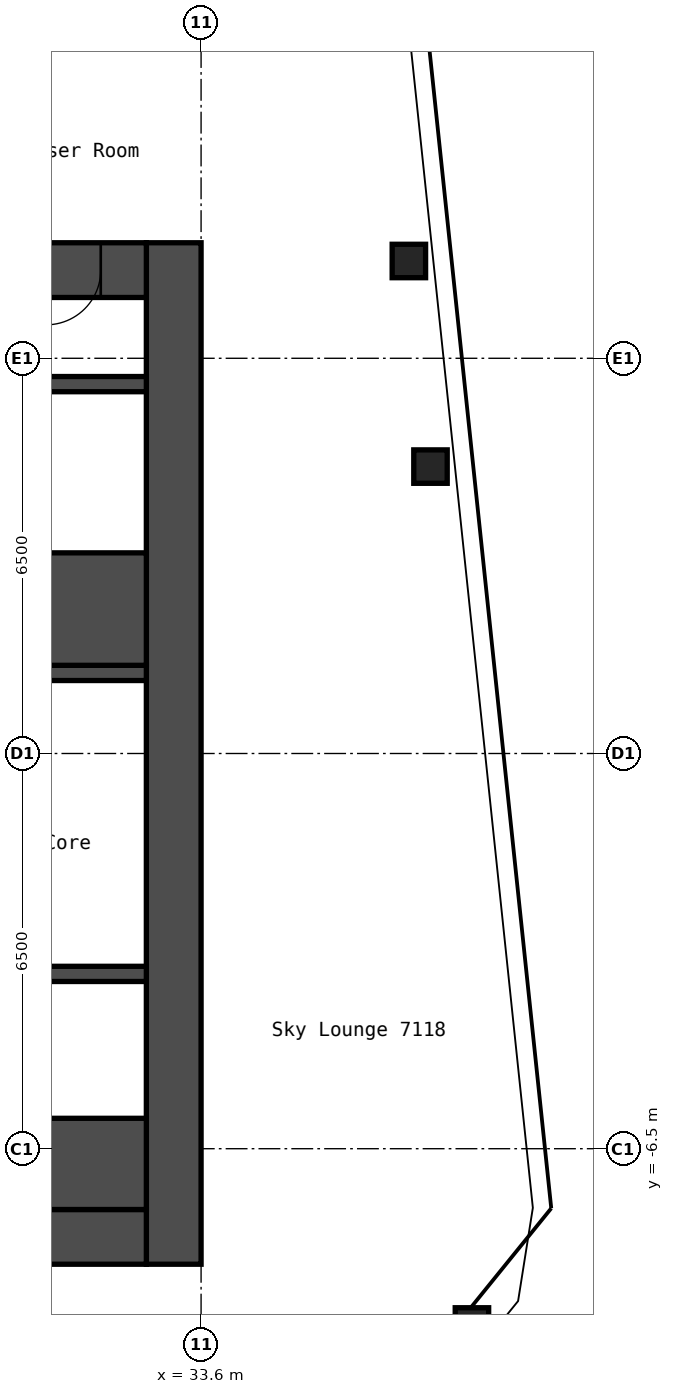
"""IFC4 building model, lengths in metres.
Left out: names, types, materials, properties, quantities, classifications, styles, units other than length and angle.
Written with IfcOpenShell. Run it as: python <this file> out.ifc"""

import sys

from ifc_helpers import new_model, si_unit, direction, frame, frame_2d, origin, origin_2d, place, context, subcontext, project, spatial, rectangle, hollow_rectangle, extrude, element, fill, save


model = new_model("IFC4")
c1 = context("Model", 3, precision=1e-05, world=origin(), true_north=direction((0.0, 1.0)))
c2 = subcontext(c1, "Body", "Model", "MODEL_VIEW")
j1 = project(units=[si_unit("LENGTHUNIT", "METRE"), si_unit("PLANEANGLEUNIT", "RADIAN")], contexts=[c1])
p1 = place(None, origin())
s1 = spatial("IfcSite", under=j1, at=p1, CompositionType="ELEMENT")
p2 = place(p1, origin())
s2 = spatial("IfcBuilding", under=s1, at=p2, CompositionType="ELEMENT")
p3 = place(p2, frame((0.0, 0.0, 251.8)))
s3 = spatial("IfcBuildingStorey", under=s2, at=p3, CompositionType="ELEMENT", Elevation=251.8)
for number, where, z_axis, x_axis in (
    (1, (38.054, -9.39, 0.0), (0.0, 0.0, 1.0), (1.0, 0.0, 0.0)),
    (2, (37.373, 4.719, 0.0), (0.0, 0.0, 1.0), (1.0, 0.0, 0.0)),
    (3, (37.017, 8.1, 0.0), (0.0, 0.0, 1.0), (1.0, 0.0, 0.0)),
):
    element("IfcColumn", number, at=place(p3, frame(where, z_axis=z_axis, x_axis=x_axis)), inside=s3, PredefinedType="COLUMN", context=c2, shape_type="SweptSolid", body=[
        extrude(hollow_rectangle(XDim=0.55, YDim=0.55, WallThickness=0.022, InnerFilletRadius=0.033, OuterFilletRadius=0.055, at=origin_2d()), origin(), (0.0, 0.0, 1.0), 2.75),
    ])
p4 = place(p3, frame((33.15, -8.4, 0.0), z_axis=(0.0, 0.0, 1.0), x_axis=(0.0, 1.0, 0.0)))
e4 = element("IfcWall", 4, at=p4, inside=s3, PredefinedType="SHEAR", context=c2, shape_type="SweptSolid", body=[
    extrude(rectangle(XDim=16.8, YDim=0.9, at=frame_2d((8.4, 0.0))), origin(), (0.0, 0.0, 1.0), 2.75),
])
p5 = place(p3, frame((17.7, 7.95, 0.0), z_axis=(0.0, 0.0, 1.0), x_axis=(1.0, 0.0, 0.0)))
e5 = element("IfcWall", 5, at=p5, inside=s3, PredefinedType="SHEAR", context=c2, shape_type="SweptSolid", body=[
    extrude(rectangle(XDim=15.0, YDim=0.9, at=frame_2d((7.5, 0.0))), origin(), (0.0, 0.0, 1.0), 2.75),
])
p6 = place(p5, frame((10.4, 0.0, 0.0)))
e6 = element("IfcOpeningElement", 6, at=p6, cuts=e5, PredefinedType="OPENING", context=c2, shape_type="SweptSolid", body=[
    extrude(rectangle(XDim=1.2, YDim=2.1, at=frame_2d((0.6, 1.05))), frame((0.0, 0.46, 0.0), z_axis=(0.0, -1.0, 0.0), x_axis=(1.0, 0.0, 0.0)), (0.0, 0.0, 1.0), 0.92),
])
p7 = place(p5, frame((13.35, 0.0, 0.0)))
e7 = element("IfcOpeningElement", 7, at=p7, cuts=e5, PredefinedType="OPENING", context=c2, shape_type="SweptSolid", body=[
    extrude(rectangle(XDim=0.9, YDim=2.1, at=frame_2d((0.45, 1.05))), frame((0.0, 0.46, 0.0), z_axis=(0.0, -1.0, 0.0), x_axis=(1.0, 0.0, 0.0)), (0.0, 0.0, 1.0), 0.92),
])
p8 = place(p3, frame((17.7, -7.95, 0.0), z_axis=(0.0, 0.0, 1.0), x_axis=(1.0, 0.0, 0.0)))
e8 = element("IfcWall", 8, at=p8, inside=s3, PredefinedType="SHEAR", context=c2, shape_type="SweptSolid", body=[
    extrude(rectangle(XDim=15.0, YDim=0.9, at=frame_2d((7.5, 0.0))), origin(), (0.0, 0.0, 1.0), 2.75),
])
p9 = place(p8, frame((2.55, 0.0, 0.0)))
e9 = element("IfcOpeningElement", 9, at=p9, cuts=e8, PredefinedType="OPENING", context=c2, shape_type="SweptSolid", body=[
    extrude(rectangle(XDim=1.0, YDim=2.1, at=frame_2d((0.5, 1.05))), frame((0.0, 0.46, 0.0), z_axis=(0.0, -1.0, 0.0), x_axis=(1.0, 0.0, 0.0)), (0.0, 0.0, 1.0), 0.92),
])
p10 = place(p3, frame((27.65, 1.325, 0.0), z_axis=(0.0, 0.0, 1.0), x_axis=(1.0, 0.0, 0.0)))
e10 = element("IfcWall", 10, at=p10, inside=s3, PredefinedType="SHEAR", context=c2, shape_type="SweptSolid", body=[
    extrude(rectangle(XDim=5.05, YDim=0.25, at=frame_2d((2.525, 0.0))), origin(), (0.0, 0.0, 1.0), 2.75),
])
p11 = place(p10, frame((0.55, 0.0, 0.0)))
e11 = element("IfcOpeningElement", 11, at=p11, cuts=e10, PredefinedType="OPENING", context=c2, shape_type="SweptSolid", body=[
    extrude(rectangle(XDim=1.2, YDim=2.1, at=frame_2d((0.6, 1.05))), frame((0.0, 0.135, 0.0), z_axis=(0.0, -1.0, 0.0), x_axis=(1.0, 0.0, 0.0)), (0.0, 0.0, 1.0), 0.27),
])
p12 = place(p3, frame((30.3, 2.375, 0.0), z_axis=(0.0, 0.0, 1.0), x_axis=(1.0, 0.0, 0.0)))
e12 = element("IfcWall", 12, at=p12, inside=s3, PredefinedType="SHEAR", context=c2, shape_type="SweptSolid", body=[
    extrude(rectangle(XDim=2.4, YDim=1.85, at=frame_2d((1.2, 0.0))), origin(), (0.0, 0.0, 1.0), 2.75),
])
p13 = place(p3, frame((30.3, 6.075, 0.0), z_axis=(0.0, 0.0, 1.0), x_axis=(1.0, 0.0, 0.0)))
e13 = element("IfcWall", 13, at=p13, inside=s3, PredefinedType="SHEAR", context=c2, shape_type="SweptSolid", body=[
    extrude(rectangle(XDim=2.4, YDim=0.25, at=frame_2d((1.2, 0.0))), origin(), (0.0, 0.0, 1.0), 2.75),
])
p14 = place(p3, frame((28.15, -3.625, 0.0), z_axis=(0.0, 0.0, 1.0), x_axis=(1.0, 0.0, 0.0)))
e14 = element("IfcWall", 14, at=p14, inside=s3, PredefinedType="SHEAR", context=c2, shape_type="SweptSolid", body=[
    extrude(rectangle(XDim=4.55, YDim=0.25, at=frame_2d((2.275, 0.0))), origin(), (0.0, 0.0, 1.0), 2.75),
])
p15 = place(p3, frame((28.15, -6.75, 0.0), z_axis=(0.0, 0.0, 1.0), x_axis=(1.0, 0.0, 0.0)))
e15 = element("IfcWall", 15, at=p15, inside=s3, PredefinedType="SHEAR", context=c2, shape_type="SweptSolid", body=[
    extrude(rectangle(XDim=4.55, YDim=1.5, at=frame_2d((2.275, 0.0))), origin(), (0.0, 0.0, 1.0), 2.75),
])
p16 = place(p3, frame((16.048, 10.533, 0.0), z_axis=(0.0, 0.0, 1.0), x_axis=(0.994522460242, 0.104523088709, 0.0)))
e16 = element("IfcWall", 16, at=p16, inside=s3, PredefinedType="PARTITIONING", context=c2, shape_type="SweptSolid", body=[
    extrude(rectangle(XDim=21.3, YDim=0.2, at=frame_2d((10.65, 0.0))), origin(), (0.0, 0.0, 1.0), 2.75),
])
p17 = place(p16, frame((2.0, 0.0, 0.0)))
e17 = element("IfcOpeningElement", 17, at=p17, cuts=e16, PredefinedType="OPENING", context=c2, shape_type="SweptSolid", body=[
    extrude(rectangle(XDim=1.0, YDim=2.1, at=frame_2d((0.5, 1.05))), frame((0.0, 0.11, 0.0), z_axis=(0.0, -1.0, 0.0), x_axis=(1.0, 0.0, 0.0)), (0.0, 0.0, 1.0), 0.22),
])
p18 = place(p16, frame((13.8, 0.0, 0.0)))
e18 = element("IfcOpeningElement", 18, at=p18, cuts=e16, PredefinedType="OPENING", context=c2, shape_type="SweptSolid", body=[
    extrude(rectangle(XDim=1.0, YDim=2.1, at=frame_2d((0.5, 1.05))), frame((0.0, 0.11, 0.0), z_axis=(0.0, -1.0, 0.0), x_axis=(1.0, 0.0, 0.0)), (0.0, 0.0, 1.0), 0.22),
])
p19 = place(p16, frame((18.45, 0.0, 0.0)))
e19 = element("IfcOpeningElement", 19, at=p19, cuts=e16, PredefinedType="OPENING", context=c2, shape_type="SweptSolid", body=[
    extrude(rectangle(XDim=0.9, YDim=2.1, at=frame_2d((0.45, 1.05))), frame((0.0, 0.11, 0.0), z_axis=(0.0, -1.0, 0.0), x_axis=(1.0, 0.0, 0.0)), (0.0, 0.0, 1.0), 0.22),
])
p20 = place(p7, origin())
e20 = element("IfcDoor", 20, at=p20, inside=s3, OperationType="SINGLE_SWING_LEFT", PredefinedType="DOOR", context=c2, shape_type="SweptSolid", body=[
    extrude(rectangle(XDim=0.9, YDim=2.1, at=frame_2d((0.45, 1.05))), frame((0.0, 0.025, 0.0), z_axis=(0.0, -1.0, 0.0), x_axis=(1.0, 0.0, 0.0)), (0.0, 0.0, 1.0), 0.05),
])
fill(e7, e20)
save(model, sys.argv[1])
